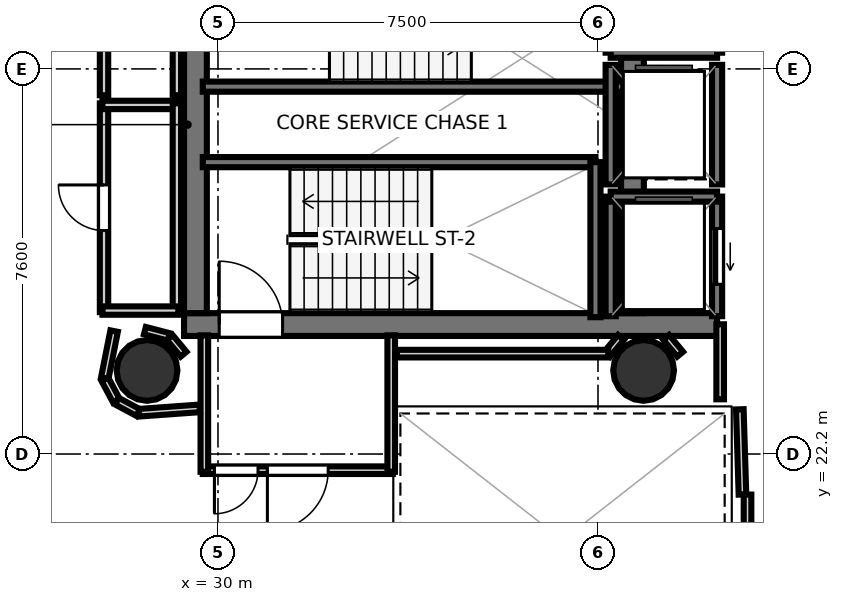
"""IFC4 building model, lengths in metres.
Left out: names, types, materials, properties, quantities, classifications, styles, units other than length and angle.
Written with IfcOpenShell. Run it as: python <this file> out.ifc"""

import sys

from ifc_helpers import new_model, si_unit, direction, frame, frame_2d, origin, origin_2d, place, context, subcontext, project, spatial, rectangle, hollow_circle, extrude, element, fill, save


model = new_model("IFC4")
c1 = context("Model", 3, precision=1e-05, world=origin(), true_north=direction((0.0, 1.0)))
c2 = subcontext(c1, "Body", "Model", "MODEL_VIEW")
j1 = project(units=[si_unit("LENGTHUNIT", "METRE"), si_unit("PLANEANGLEUNIT", "RADIAN")], contexts=[c1])
p1 = place(None, origin())
s1 = spatial("IfcSite", under=j1, at=p1, CompositionType="ELEMENT")
p2 = place(p1, origin())
s2 = spatial("IfcBuilding", under=s1, at=p2, CompositionType="ELEMENT")
p3 = place(p2, frame((0.0, 0.0, 192.9)))
s3 = spatial("IfcBuildingStorey", under=s2, at=p3, CompositionType="ELEMENT", Elevation=192.9)
p4 = place(p3, frame((29.33, 24.755, 0.0), z_axis=(0.0, 0.0, 1.0), x_axis=(1.0, 0.0, 0.0)))
e1 = element("IfcWall", 1, at=p4, inside=s3, PredefinedType="SHEAR", context=c2, shape_type="SweptSolid", body=[
    extrude(rectangle(XDim=10.52, YDim=0.45, at=frame_2d((5.26, 0.0))), origin(), (0.0, 0.0, 1.0), 3.52),
])
p5 = place(p4, frame((0.695, 0.0, 0.0)))
e2 = element("IfcOpeningElement", 2, at=p5, cuts=e1, PredefinedType="OPENING", context=c2, shape_type="SweptSolid", body=[
    extrude(rectangle(XDim=1.25, YDim=2.15, at=frame_2d((0.625, 1.075))), frame((0.0, 0.235, 0.0), z_axis=(0.0, -1.0, 0.0), x_axis=(1.0, 0.0, 0.0)), (0.0, 0.0, 1.0), 0.47),
])
for number, where, z_axis, x_axis in (
    (3, (29.555, 24.98, 0.0), (0.0, 0.0, 1.0), (0.0, 1.0, 0.0)),
    (4, (38.18, 24.98, 0.0), (0.0, 0.0, 1.0), (0.0, 1.0, 0.0)),
):
    element("IfcWall", number, at=place(p3, frame(where, z_axis=z_axis, x_axis=x_axis)), inside=s3, PredefinedType="SHEAR", context=c2, shape_type="SweptSolid", body=[
        extrude(rectangle(XDim=7.44, YDim=0.45, at=frame_2d((3.72, 0.0))), origin(), (0.0, 0.0, 1.0), 3.52),
    ])
for number, where, z_axis, x_axis in (
    (5, (28.6, 23.85, 0.0), (0.0, 0.0, 1.0), (1.0, 0.0, 0.0)),
    (6, (38.4, 23.85, 0.0), (0.0, 0.0, 1.0), (1.0, 0.0, 0.0)),
):
    element("IfcColumn", number, at=place(p3, frame(where, z_axis=z_axis, x_axis=x_axis)), inside=s3, PredefinedType="COLUMN", context=c2, shape_type="SweptSolid", body=[
        extrude(hollow_circle(Radius=0.6, WallThickness=0.03, at=origin_2d()), origin(), (0.0, 0.0, 1.0), 3.7),
    ])
p6 = place(p3, frame((29.7, 29.45, 0.0), z_axis=(0.0, 0.0, 1.0), x_axis=(1.0, 0.0, 0.0)))
e7 = element("IfcWall", 7, at=p6, inside=s3, PredefinedType="SOLIDWALL", context=c2, shape_type="SweptSolid", body=[
    extrude(rectangle(XDim=8.3, YDim=0.2, at=frame_2d((4.15, 0.0))), origin(), (0.0, 0.0, 1.0), 3.52),
])
p7 = place(p3, frame((29.7, 27.96, 0.0), z_axis=(0.0, 0.0, 1.0), x_axis=(1.0, 0.0, 0.0)))
e8 = element("IfcWall", 8, at=p7, inside=s3, PredefinedType="SOLIDWALL", context=c2, shape_type="SweptSolid", body=[
    extrude(rectangle(XDim=7.75, YDim=0.2, at=frame_2d((3.875, 0.0))), origin(), (0.0, 0.0, 1.0), 3.52),
])
p8 = place(p3, frame((37.45, 24.9, 0.0), z_axis=(0.0, 0.0, 1.0), x_axis=(0.0, 1.0, 0.0)))
e9 = element("IfcWall", 9, at=p8, inside=s3, PredefinedType="SOLIDWALL", context=c2, shape_type="SweptSolid", body=[
    extrude(rectangle(XDim=3.06, YDim=0.2, at=frame_2d((1.53, 0.0))), origin(), (0.0, 0.0, 1.0), 3.52),
])
p9 = place(p3, frame((37.75, 30.12, 0.0), z_axis=(0.0, 0.0, 1.0), x_axis=(1.0, 0.0, 0.0)))
e10 = element("IfcWall", 10, at=p9, inside=s3, PredefinedType="SOLIDWALL", context=c2, shape_type="SweptSolid", body=[
    extrude(rectangle(XDim=2.1, YDim=0.2, at=frame_2d((1.05, 0.0))), origin(), (0.0, 0.0, 1.0), 3.52),
])
p10 = place(p3, frame((39.85, 24.92, 0.0), z_axis=(0.0, 0.0, 1.0), x_axis=(0.0, 1.0, 0.0)))
e11 = element("IfcWall", 11, at=p10, inside=s3, PredefinedType="SOLIDWALL", context=c2, shape_type="SweptSolid", body=[
    extrude(rectangle(XDim=2.36, YDim=0.2, at=frame_2d((1.18, 0.0))), origin(), (0.0, 0.0, 1.0), 3.52),
])
p11 = place(p10, frame((0.63, 0.0, 0.0)))
e12 = element("IfcOpeningElement", 12, at=p11, cuts=e11, PredefinedType="OPENING", context=c2, shape_type="SweptSolid", body=[
    extrude(rectangle(XDim=1.1, YDim=2.15, at=frame_2d((0.55, 1.075))), frame((0.0, 0.11, 0.0), z_axis=(0.0, -1.0, 0.0), x_axis=(1.0, 0.0, 0.0)), (0.0, 0.0, 1.0), 0.22),
])
p12 = place(p3, frame((37.75, 24.92, 0.0), z_axis=(0.0, 0.0, 1.0), x_axis=(0.0, 1.0, 0.0)))
e13 = element("IfcWall", 13, at=p12, inside=s3, PredefinedType="SOLIDWALL", context=c2, shape_type="SweptSolid", body=[
    extrude(rectangle(XDim=2.36, YDim=0.2, at=frame_2d((1.18, 0.0))), origin(), (0.0, 0.0, 1.0), 3.52),
])
p13 = place(p3, frame((37.75, 27.28, 0.0), z_axis=(0.0, 0.0, 1.0), x_axis=(1.0, 0.0, 0.0)))
e14 = element("IfcWall", 14, at=p13, inside=s3, PredefinedType="SOLIDWALL", context=c2, shape_type="SweptSolid", body=[
    extrude(rectangle(XDim=2.1, YDim=0.2, at=frame_2d((1.05, 0.0))), origin(), (0.0, 0.0, 1.0), 3.52),
])
for number, where, z_axis, x_axis in (
    (15, (39.85, 27.52, 0.0), (0.0, 0.0, 1.0), (0.0, 1.0, 0.0)),
    (16, (37.75, 27.52, 0.0), (0.0, 0.0, 1.0), (0.0, 1.0, 0.0)),
):
    element("IfcWall", number, at=place(p3, frame(where, z_axis=z_axis, x_axis=x_axis)), inside=s3, PredefinedType="SOLIDWALL", context=c2, shape_type="SweptSolid", body=[
        extrude(rectangle(XDim=2.36, YDim=0.2, at=frame_2d((1.18, 0.0))), origin(), (0.0, 0.0, 1.0), 3.52),
    ])
p14 = place(p3, frame((33.45, 21.881, 0.0), z_axis=(0.0, 0.0, 1.0), x_axis=(-1.0, 0.0, 0.0)))
e17 = element("IfcWall", 17, at=p14, inside=s3, PredefinedType="PARTITIONING", context=c2, shape_type="SweptSolid", body=[
    extrude(rectangle(XDim=3.75, YDim=0.15, at=frame_2d((1.875, 0.0))), origin(), (0.0, 0.0, 1.0), 2.84),
])
p15 = place(p14, frame((1.275, 0.0, 0.0)))
e18 = element("IfcOpeningElement", 18, at=p15, cuts=e17, PredefinedType="OPENING", context=c2, shape_type="SweptSolid", body=[
    extrude(rectangle(XDim=1.2, YDim=2.15, at=frame_2d((0.6, 1.075))), frame((0.0, 0.085, 0.0), z_axis=(0.0, -1.0, 0.0), x_axis=(1.0, 0.0, 0.0)), (0.0, 0.0, 1.0), 0.17),
])
p16 = place(p14, frame((2.66, 0.0, 0.0)))
e19 = element("IfcOpeningElement", 19, at=p16, cuts=e17, PredefinedType="OPENING", context=c2, shape_type="SweptSolid", body=[
    extrude(rectangle(XDim=0.86, YDim=2.05, at=frame_2d((0.43, 1.025))), frame((0.0, 0.085, 0.0), z_axis=(0.0, -1.0, 0.0), x_axis=(1.0, 0.0, 0.0)), (0.0, 0.0, 1.0), 0.17),
])
for number, where, z_axis, x_axis in (
    (20, (29.731, 21.85, 0.0), (0.0, 0.0, 1.0), (0.0, 1.0, 0.0)),
    (21, (33.419, 24.542, 0.0), (0.0, 0.0, 1.0), (0.0, -1.0, 0.0)),
):
    element("IfcWall", number, at=place(p3, frame(where, z_axis=z_axis, x_axis=x_axis)), inside=s3, PredefinedType="PARTITIONING", context=c2, shape_type="SweptSolid", body=[
        extrude(rectangle(XDim=2.692, YDim=0.15, at=frame_2d((1.346, 0.0))), origin(), (0.0, 0.0, 1.0), 2.84),
    ])
p17 = place(p3, frame((40.351, 21.401, 0.0), z_axis=(0.0, 0.0, 1.0), x_axis=(-0.031058045979, 0.999517582527, 0.0)))
e22 = element("IfcWall", 22, at=p17, inside=s3, PredefinedType="PARTITIONING", context=c2, shape_type="SweptSolid", body=[
    extrude(rectangle(XDim=1.682, YDim=0.15, at=frame_2d((0.841, 0.0))), origin(), (0.0, 0.0, 1.0), 2.84),
])
p18 = place(p3, frame((39.911, 23.28, 0.0), z_axis=(0.0, 0.0, 1.0), x_axis=(0.0, 1.0, 0.0)))
e23 = element("IfcWall", 23, at=p18, inside=s3, PredefinedType="PARTITIONING", context=c2, shape_type="SweptSolid", body=[
    extrude(rectangle(XDim=1.48, YDim=0.15, at=frame_2d((0.74, 0.0))), origin(), (0.0, 0.0, 1.0), 2.84),
])
p19 = place(p3, frame((40.451, 18.08, 0.0), z_axis=(0.0, 0.0, 1.0), x_axis=(0.0, 1.0, 0.0)))
e24 = element("IfcWall", 24, at=p19, inside=s3, PredefinedType="PARTITIONING", context=c2, shape_type="SweptSolid", body=[
    extrude(rectangle(XDim=3.32, YDim=0.15, at=frame_2d((1.66, 0.0))), origin(), (0.0, 0.0, 1.0), 2.84),
])
p20 = place(p3, frame((27.751, 25.0, 0.0), z_axis=(0.0, 0.0, 1.0), x_axis=(0.0, 1.0, 0.0)))
e25 = element("IfcWall", 25, at=p20, inside=s3, PredefinedType="PLUMBINGWALL", context=c2, shape_type="SweptSolid", body=[
    extrude(rectangle(XDim=4.12, YDim=0.165, at=frame_2d((2.06, 0.0))), origin(), (0.0, 0.0, 1.0), 2.84),
])
p21 = place(p20, frame((1.61, 0.0, 0.0)))
e26 = element("IfcOpeningElement", 26, at=p21, cuts=e25, PredefinedType="OPENING", context=c2, shape_type="SweptSolid", body=[
    extrude(rectangle(XDim=0.9, YDim=2.1, at=frame_2d((0.45, 1.05))), frame((0.0, 0.093, 0.0), z_axis=(0.0, -1.0, 0.0), x_axis=(1.0, 0.0, 0.0)), (0.0, 0.0, 1.0), 0.185),
])
p22 = place(p3, frame((27.72, 29.089, 0.0), z_axis=(0.0, 0.0, 1.0), x_axis=(1.0, 0.0, 0.0)))
e27 = element("IfcWall", 27, at=p22, inside=s3, PredefinedType="PLUMBINGWALL", context=c2, shape_type="SweptSolid", body=[
    extrude(rectangle(XDim=1.5, YDim=0.165, at=frame_2d((0.75, 0.0))), origin(), (0.0, 0.0, 1.0), 2.84),
])
p23 = place(p3, frame((29.189, 29.12, 0.0), z_axis=(0.0, 0.0, 1.0), x_axis=(0.0, -1.0, 0.0)))
e28 = element("IfcWall", 28, at=p23, inside=s3, PredefinedType="PLUMBINGWALL", context=c2, shape_type="SweptSolid", body=[
    extrude(rectangle(XDim=4.12, YDim=0.165, at=frame_2d((2.06, 0.0))), origin(), (0.0, 0.0, 1.0), 2.84),
])
p24 = place(p3, frame((29.22, 25.031, 0.0), z_axis=(0.0, 0.0, 1.0), x_axis=(-1.0, 0.0, 0.0)))
e29 = element("IfcWall", 29, at=p24, inside=s3, PredefinedType="PLUMBINGWALL", context=c2, shape_type="SweptSolid", body=[
    extrude(rectangle(XDim=1.5, YDim=0.165, at=frame_2d((0.75, 0.0))), origin(), (0.0, 0.0, 1.0), 2.84),
])
p25 = place(p3, frame((27.751, 29.28, 0.0), z_axis=(0.0, 0.0, 1.0), x_axis=(0.0, 1.0, 0.0)))
e30 = element("IfcWall", 30, at=p25, inside=s3, PredefinedType="PLUMBINGWALL", context=c2, shape_type="SweptSolid", body=[
    extrude(rectangle(XDim=3.17, YDim=0.165, at=frame_2d((1.585, 0.0))), origin(), (0.0, 0.0, 1.0), 2.84),
])
p26 = place(p25, frame((1.155, 0.0, 0.0)))
e31 = element("IfcOpeningElement", 31, at=p26, cuts=e30, PredefinedType="OPENING", context=c2, shape_type="SweptSolid", body=[
    extrude(rectangle(XDim=0.86, YDim=2.05, at=frame_2d((0.43, 1.025))), frame((0.0, 0.093, 0.0), z_axis=(0.0, -1.0, 0.0), x_axis=(1.0, 0.0, 0.0)), (0.0, 0.0, 1.0), 0.185),
])
p27 = place(p3, frame((29.189, 32.45, 0.0), z_axis=(0.0, 0.0, 1.0), x_axis=(0.0, -1.0, 0.0)))
e32 = element("IfcWall", 32, at=p27, inside=s3, PredefinedType="PLUMBINGWALL", context=c2, shape_type="SweptSolid", body=[
    extrude(rectangle(XDim=3.17, YDim=0.165, at=frame_2d((1.585, 0.0))), origin(), (0.0, 0.0, 1.0), 2.84),
])
p28 = place(p3, frame((29.321, 24.17, 0.0), z_axis=(0.0, 0.0, 1.0), x_axis=(-0.638008265708, 0.770029514296, 0.0)))
e33 = element("IfcWall", 33, at=p28, inside=s3, PredefinedType="PARTITIONING", context=c2, shape_type="SweptSolid", body=[
    extrude(rectangle(XDim=0.431, YDim=0.15, at=frame_2d((0.215, 0.0))), origin(), (0.0, 0.0, 1.0), 2.84),
])
p29 = place(p3, frame((29.03, 24.512, 0.0), z_axis=(0.0, 0.0, 1.0), x_axis=(-0.967681003213, 0.252177469296, 0.0)))
e34 = element("IfcWall", 34, at=p29, inside=s3, PredefinedType="PARTITIONING", context=c2, shape_type="SweptSolid", body=[
    extrude(rectangle(XDim=0.488, YDim=0.15, at=frame_2d((0.244, 0.0))), origin(), (0.0, 0.0, 1.0), 2.84),
])
for number, where, z_axis, x_axis in (
    (35, (39.121, 24.17, 0.0), (0.0, 0.0, 1.0), (-0.638, 0.77, 0.0)),
    (36, (37.954, 24.502, 0.0), (0.0, 0.0, 1.0), (-0.638, -0.77, 0.0)),
):
    element("IfcWall", number, at=place(p3, frame(where, z_axis=z_axis, x_axis=x_axis)), inside=s3, PredefinedType="PARTITIONING", context=c2, shape_type="SweptSolid", body=[
        extrude(rectangle(XDim=0.431, YDim=0.15, at=frame_2d((0.215, 0.0))), origin(), (0.0, 0.0, 1.0), 2.84),
    ])
p30 = place(p3, frame((37.703, 24.181, 0.0), z_axis=(0.0, 0.0, 1.0), x_axis=(-1.0, 0.0, 0.0)))
e37 = element("IfcWall", 37, at=p30, inside=s3, PredefinedType="PARTITIONING", context=c2, shape_type="SweptSolid", body=[
    extrude(rectangle(XDim=4.173, YDim=0.15, at=frame_2d((2.086, 0.0))), origin(), (0.0, 0.0, 1.0), 2.84),
])
p31 = place(p3, frame((27.95, 24.626, 0.0), z_axis=(0.0, 0.0, 1.0), x_axis=(-0.195125950178, -0.980778192848, 0.0)))
e38 = element("IfcWall", 38, at=p31, inside=s3, PredefinedType="PARTITIONING", context=c2, shape_type="SweptSolid", body=[
    extrude(rectangle(XDim=0.948, YDim=0.15, at=frame_2d((0.474, 0.0))), origin(), (0.0, 0.0, 1.0), 2.84),
])
for number, where, z_axis, x_axis in (
    (39, (27.768, 23.675, 0.0), (0.0, 0.0, 1.0), (0.472, -0.882, 0.0)),
    (40, (28.006, 23.243, 0.0), (0.0, 0.0, 1.0), (0.882, -0.472, 0.0)),
):
    element("IfcWall", number, at=place(p3, frame(where, z_axis=z_axis, x_axis=x_axis)), inside=s3, PredefinedType="PARTITIONING", context=c2, shape_type="SweptSolid", body=[
        extrude(rectangle(XDim=0.476, YDim=0.15, at=frame_2d((0.238, 0.0))), origin(), (0.0, 0.0, 1.0), 2.84),
    ])
p32 = place(p3, frame((28.442, 23.015, 0.0), z_axis=(0.0, 0.0, 1.0), x_axis=(0.99740683837, 0.07196942943, 0.0)))
e41 = element("IfcWall", 41, at=p32, inside=s3, PredefinedType="PARTITIONING", context=c2, shape_type="SweptSolid", body=[
    extrude(rectangle(XDim=1.201, YDim=0.15, at=frame_2d((0.601, 0.0))), origin(), (0.0, 0.0, 1.0), 2.84),
])
p33 = place(p5, origin())
e42 = element("IfcDoor", 42, at=p33, inside=s3, OperationType="SINGLE_SWING_LEFT", PredefinedType="DOOR", context=c2, shape_type="SweptSolid", body=[
    extrude(rectangle(XDim=1.25, YDim=2.15, at=frame_2d((0.625, 1.075))), frame((0.0, 0.025, 0.0), z_axis=(0.0, -1.0, 0.0), x_axis=(1.0, 0.0, 0.0)), (0.0, 0.0, 1.0), 0.05),
])
fill(e2, e42)
p34 = place(p11, origin())
e43 = element("IfcDoor", 43, at=p34, inside=s3, OperationType="SLIDING_TO_LEFT", PredefinedType="DOOR", context=c2, shape_type="SweptSolid", body=[
    extrude(rectangle(XDim=1.1, YDim=2.15, at=frame_2d((0.55, 1.075))), frame((0.0, 0.025, 0.0), z_axis=(0.0, -1.0, 0.0), x_axis=(1.0, 0.0, 0.0)), (0.0, 0.0, 1.0), 0.05),
])
fill(e12, e43)
p35 = place(p15, origin())
e44 = element("IfcDoor", 44, at=p35, inside=s3, OperationType="SINGLE_SWING_RIGHT", PredefinedType="DOOR", context=c2, shape_type="SweptSolid", body=[
    extrude(rectangle(XDim=1.2, YDim=2.15, at=frame_2d((0.6, 1.075))), frame((0.0, 0.025, 0.0), z_axis=(0.0, -1.0, 0.0), x_axis=(1.0, 0.0, 0.0)), (0.0, 0.0, 1.0), 0.05),
])
fill(e18, e44)
p36 = place(p21, origin())
e45 = element("IfcDoor", 45, at=p36, inside=s3, OperationType="SINGLE_SWING_RIGHT", PredefinedType="DOOR", context=c2, shape_type="SweptSolid", body=[
    extrude(rectangle(XDim=0.9, YDim=2.1, at=frame_2d((0.45, 1.05))), frame((0.0, 0.025, 0.0), z_axis=(0.0, -1.0, 0.0), x_axis=(1.0, 0.0, 0.0)), (0.0, 0.0, 1.0), 0.05),
])
fill(e26, e45)
p37 = place(p16, origin())
e46 = element("IfcDoor", 46, at=p37, inside=s3, OperationType="SINGLE_SWING_RIGHT", PredefinedType="DOOR", context=c2, shape_type="SweptSolid", body=[
    extrude(rectangle(XDim=0.86, YDim=2.05, at=frame_2d((0.43, 1.025))), frame((0.0, 0.025, 0.0), z_axis=(0.0, -1.0, 0.0), x_axis=(1.0, 0.0, 0.0)), (0.0, 0.0, 1.0), 0.05),
])
fill(e19, e46)
save(model, sys.argv[1])
